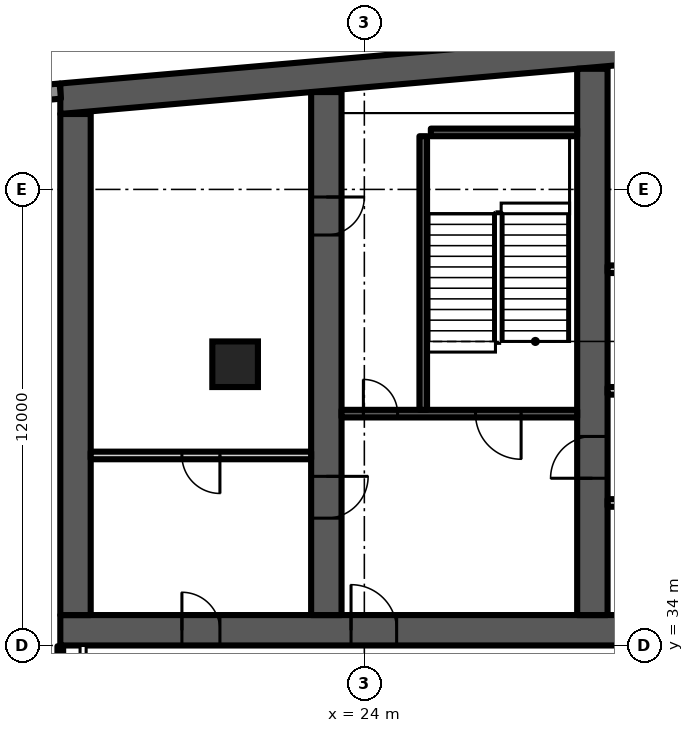
"""IFC4 building model, lengths in metres.
Left out: names, types, materials, properties, quantities, classifications, styles, units other than length and angle.
Written with IfcOpenShell. Run it as: python <this file> out.ifc"""

import sys

from ifc_helpers import new_model, si_unit, direction, frame, frame_2d, origin, origin_2d, place, context, subcontext, project, spatial, polyline, rectangle, outline, extrude, element, fill, save


model = new_model("IFC4")
c1 = context("Model", 3, precision=1e-05, world=origin(), true_north=direction((0.0, 1.0)))
c2 = subcontext(c1, "Body", "Model", "MODEL_VIEW")
j1 = project(units=[si_unit("LENGTHUNIT", "METRE"), si_unit("PLANEANGLEUNIT", "RADIAN")], contexts=[c1])
p1 = place(None, origin())
s1 = spatial("IfcSite", under=j1, at=p1, CompositionType="ELEMENT")
p2 = place(p1, origin())
s2 = spatial("IfcBuilding", under=s1, at=p2, CompositionType="ELEMENT")
p3 = place(p2, frame((0.0, 0.0, 202.3)))
s3 = spatial("IfcBuildingStorey", under=s2, at=p3, CompositionType="ELEMENT", Elevation=202.3)
p4 = place(p3, origin())
e1 = element("IfcWall", 1, at=p4, inside=s3, PredefinedType="SHEAR", context=c2, shape_type="SweptSolid", body=[
    extrude(outline(polyline([(16.0, 47.984), (37.0, 49.822), (58.0, 47.984), (58.0, 48.787), (37.0, 50.625), (16.0, 48.787), (16.0, 47.984)])), origin(), (0.0, 0.0, 1.0), 4.8),
])
p5 = place(p3, frame((16.0, 34.4, 0.0), z_axis=(0.0, 0.0, 1.0), x_axis=(1.0, 0.0, 0.0)))
e2 = element("IfcWall", 2, at=p5, inside=s3, PredefinedType="SHEAR", context=c2, shape_type="SweptSolid", body=[
    extrude(rectangle(XDim=42.0, YDim=0.8, at=frame_2d((21.0, 0.0))), origin(), (0.0, 0.0, 1.0), 4.8),
])
p6 = place(p5, frame((3.2, 0.0, 0.0)))
e3 = element("IfcOpeningElement", 3, at=p6, cuts=e2, PredefinedType="OPENING", context=c2, shape_type="SweptSolid", body=[
    extrude(rectangle(XDim=1.0, YDim=2.1, at=frame_2d((0.5, 1.05))), frame((0.0, 0.41, 0.0), z_axis=(0.0, -1.0, 0.0), x_axis=(1.0, 0.0, 0.0)), (0.0, 0.0, 1.0), 0.82),
])
p7 = place(p5, frame((7.65, 0.0, 0.0)))
e4 = element("IfcOpeningElement", 4, at=p7, cuts=e2, PredefinedType="OPENING", context=c2, shape_type="SweptSolid", body=[
    extrude(rectangle(XDim=1.2, YDim=2.1, at=frame_2d((0.6, 1.05))), frame((0.0, 0.41, 0.0), z_axis=(0.0, -1.0, 0.0), x_axis=(1.0, 0.0, 0.0)), (0.0, 0.0, 1.0), 0.82),
])
p8 = place(p5, frame((14.767, 0.0, 0.0)))
e5 = element("IfcOpeningElement", 5, at=p8, cuts=e2, PredefinedType="OPENING", context=c2, shape_type="SweptSolid", body=[
    extrude(rectangle(XDim=1.1, YDim=2.1, at=frame_2d((0.55, 1.05))), frame((0.0, 0.41, 0.0), z_axis=(0.0, -1.0, 0.0), x_axis=(1.0, 0.0, 0.0)), (0.0, 0.0, 1.0), 0.82),
])
p9 = place(p5, frame((19.133, 0.0, 0.0)))
e6 = element("IfcOpeningElement", 6, at=p9, cuts=e2, PredefinedType="OPENING", context=c2, shape_type="SweptSolid", body=[
    extrude(rectangle(XDim=1.1, YDim=2.1, at=frame_2d((0.55, 1.05))), frame((0.0, 0.41, 0.0), z_axis=(0.0, -1.0, 0.0), x_axis=(1.0, 0.0, 0.0)), (0.0, 0.0, 1.0), 0.82),
])
p10 = place(p5, frame((16.8, 0.0, 0.0)))
e7 = element("IfcOpeningElement", 7, at=p10, cuts=e2, PredefinedType="OPENING", context=c2, shape_type="SweptSolid", body=[
    extrude(rectangle(XDim=1.4, YDim=2.1, at=frame_2d((0.7, 1.05))), frame((0.0, 0.41, 0.0), z_axis=(0.0, -1.0, 0.0), x_axis=(1.0, 0.0, 0.0)), (0.0, 0.0, 1.0), 0.82),
])
p11 = place(p5, frame((21.767, 0.0, 0.0)))
e8 = element("IfcOpeningElement", 8, at=p11, cuts=e2, PredefinedType="OPENING", context=c2, shape_type="SweptSolid", body=[
    extrude(rectangle(XDim=1.1, YDim=2.1, at=frame_2d((0.55, 1.05))), frame((0.0, 0.41, 0.0), z_axis=(0.0, -1.0, 0.0), x_axis=(1.0, 0.0, 0.0)), (0.0, 0.0, 1.0), 0.82),
])
p12 = place(p5, frame((23.95, 0.0, 0.0)))
e9 = element("IfcOpeningElement", 9, at=p12, cuts=e2, PredefinedType="OPENING", context=c2, shape_type="SweptSolid", body=[
    extrude(rectangle(XDim=1.1, YDim=2.1, at=frame_2d((0.55, 1.05))), frame((0.0, 0.41, 0.0), z_axis=(0.0, -1.0, 0.0), x_axis=(1.0, 0.0, 0.0)), (0.0, 0.0, 1.0), 0.82),
])
p13 = place(p5, frame((26.133, 0.0, 0.0)))
e10 = element("IfcOpeningElement", 10, at=p13, cuts=e2, PredefinedType="OPENING", context=c2, shape_type="SweptSolid", body=[
    extrude(rectangle(XDim=1.1, YDim=2.1, at=frame_2d((0.55, 1.05))), frame((0.0, 0.41, 0.0), z_axis=(0.0, -1.0, 0.0), x_axis=(1.0, 0.0, 0.0)), (0.0, 0.0, 1.0), 0.82),
])
p14 = place(p5, frame((33.15, 0.0, 0.0)))
e11 = element("IfcOpeningElement", 11, at=p14, cuts=e2, PredefinedType="OPENING", context=c2, shape_type="SweptSolid", body=[
    extrude(rectangle(XDim=1.2, YDim=2.1, at=frame_2d((0.6, 1.05))), frame((0.0, 0.41, 0.0), z_axis=(0.0, -1.0, 0.0), x_axis=(1.0, 0.0, 0.0)), (0.0, 0.0, 1.0), 0.82),
])
p15 = place(p5, frame((37.767, 0.0, 0.0)))
e12 = element("IfcOpeningElement", 12, at=p15, cuts=e2, PredefinedType="OPENING", context=c2, shape_type="SweptSolid", body=[
    extrude(rectangle(XDim=1.4, YDim=2.1, at=frame_2d((0.7, 1.05))), frame((0.0, 0.41, 0.0), z_axis=(0.0, -1.0, 0.0), x_axis=(1.0, 0.0, 0.0)), (0.0, 0.0, 1.0), 0.82),
])
p16 = place(p3, frame((16.4, 34.8, 0.0), z_axis=(0.0, 0.0, 1.0), x_axis=(0.0, 1.0, 0.0)))
e13 = element("IfcWall", 13, at=p16, inside=s3, PredefinedType="SHEAR", context=c2, shape_type="SweptSolid", body=[
    extrude(rectangle(XDim=13.184, YDim=0.8, at=frame_2d((6.592, 0.0))), origin(), (0.0, 0.0, 1.0), 4.8),
])
p17 = place(p3, frame((23.0, 34.8, 0.0), z_axis=(0.0, 0.0, 1.0), x_axis=(0.0, 1.0, 0.0)))
e14 = element("IfcWall", 14, at=p17, inside=s3, PredefinedType="SHEAR", context=c2, shape_type="SweptSolid", body=[
    extrude(rectangle(XDim=13.762, YDim=0.8, at=frame_2d((6.881, 0.0))), origin(), (0.0, 0.0, 1.0), 4.8),
])
p18 = place(p17, frame((2.55, 0.0, 0.0)))
e15 = element("IfcOpeningElement", 15, at=p18, cuts=e14, PredefinedType="OPENING", context=c2, shape_type="SweptSolid", body=[
    extrude(rectangle(XDim=1.1, YDim=2.1, at=frame_2d((0.55, 1.05))), frame((0.0, 0.41, 0.0), z_axis=(0.0, -1.0, 0.0), x_axis=(1.0, 0.0, 0.0)), (0.0, 0.0, 1.0), 0.82),
])
p19 = place(p17, frame((10.0, 0.0, 0.0)))
e16 = element("IfcOpeningElement", 16, at=p19, cuts=e14, PredefinedType="OPENING", context=c2, shape_type="SweptSolid", body=[
    extrude(rectangle(XDim=1.0, YDim=2.1, at=frame_2d((0.5, 1.05))), frame((0.0, 0.41, 0.0), z_axis=(0.0, -1.0, 0.0), x_axis=(1.0, 0.0, 0.0)), (0.0, 0.0, 1.0), 0.82),
])
p20 = place(p3, frame((30.0, 34.8, 0.0), z_axis=(0.0, 0.0, 1.0), x_axis=(0.0, 1.0, 0.0)))
e17 = element("IfcWall", 17, at=p20, inside=s3, PredefinedType="SHEAR", context=c2, shape_type="SweptSolid", body=[
    extrude(rectangle(XDim=14.374, YDim=0.8, at=frame_2d((7.187, 0.0))), origin(), (0.0, 0.0, 1.0), 4.8),
])
p21 = place(p20, frame((3.6, 0.0, 0.0)))
e18 = element("IfcOpeningElement", 18, at=p21, cuts=e17, PredefinedType="OPENING", context=c2, shape_type="SweptSolid", body=[
    extrude(rectangle(XDim=1.1, YDim=2.1, at=frame_2d((0.55, 1.05))), frame((0.0, 0.41, 0.0), z_axis=(0.0, -1.0, 0.0), x_axis=(1.0, 0.0, 0.0)), (0.0, 0.0, 1.0), 0.82),
])
p22 = place(p3, frame((20.6, 41.4, 0.0), z_axis=(0.0, 0.0, 1.0), x_axis=(1.0, 0.0, 0.0)))
e19 = element("IfcColumn", 19, at=p22, inside=s3, PredefinedType="COLUMN", context=c2, shape_type="SweptSolid", body=[
    extrude(rectangle(XDim=1.2, YDim=1.2, at=origin_2d()), origin(), (0.0, 0.0, 1.0), 4.8),
])
p23 = place(p3, frame((16.0, 48.587, 0.0), z_axis=(0.0, 0.0, 1.0), x_axis=(-0.996194, -0.087168, 0.0)))
e20 = element("IfcWall", 20, at=p23, inside=s3, PredefinedType="SOLIDWALL", context=c2, shape_type="SweptSolid", body=[
    extrude(rectangle(XDim=2.994, YDim=0.4, at=frame_2d((1.497, 0.0))), origin(), (0.0, 0.0, 1.0), 4.4),
])
p24 = place(p3, frame((16.8, 39.0, 0.0), z_axis=(0.0, 0.0, 1.0), x_axis=(1.0, 0.0, 0.0)))
e21 = element("IfcWall", 21, at=p24, inside=s3, PredefinedType="PARTITIONING", context=c2, shape_type="SweptSolid", body=[
    extrude(rectangle(XDim=5.8, YDim=0.2, at=frame_2d((2.9, 0.0))), origin(), (0.0, 0.0, 1.0), 4.4),
])
p25 = place(p24, frame((2.4, 0.0, 0.0)))
e22 = element("IfcOpeningElement", 22, at=p25, cuts=e21, PredefinedType="OPENING", context=c2, shape_type="SweptSolid", body=[
    extrude(rectangle(XDim=1.0, YDim=2.1, at=frame_2d((0.5, 1.05))), frame((0.0, 0.11, 0.0), z_axis=(0.0, -1.0, 0.0), x_axis=(1.0, 0.0, 0.0)), (0.0, 0.0, 1.0), 0.22),
])
p26 = place(p3, frame((23.4, 40.1, 0.0), z_axis=(0.0, 0.0, 1.0), x_axis=(1.0, 0.0, 0.0)))
e23 = element("IfcWall", 23, at=p26, inside=s3, PredefinedType="SHEAR", context=c2, shape_type="SweptSolid", body=[
    extrude(rectangle(XDim=6.2, YDim=0.2, at=frame_2d((3.1, 0.0))), origin(), (0.0, 0.0, 1.0), 4.4),
])
p27 = place(p26, frame((3.525, 0.0, 0.0)))
e24 = element("IfcOpeningElement", 24, at=p27, cuts=e23, PredefinedType="OPENING", context=c2, shape_type="SweptSolid", body=[
    extrude(rectangle(XDim=1.2, YDim=2.1, at=frame_2d((0.6, 1.05))), frame((0.0, 0.11, 0.0), z_axis=(0.0, -1.0, 0.0), x_axis=(1.0, 0.0, 0.0)), (0.0, 0.0, 1.0), 0.22),
])
p28 = place(p26, frame((0.575, 0.0, 0.0)))
e25 = element("IfcOpeningElement", 25, at=p28, cuts=e23, PredefinedType="OPENING", context=c2, shape_type="SweptSolid", body=[
    extrude(rectangle(XDim=0.9, YDim=2.1, at=frame_2d((0.45, 1.05))), frame((0.0, 0.11, 0.0), z_axis=(0.0, -1.0, 0.0), x_axis=(1.0, 0.0, 0.0)), (0.0, 0.0, 1.0), 0.22),
])
p29 = place(p3, frame((25.55, 40.2, 0.0), z_axis=(0.0, 0.0, 1.0), x_axis=(0.0, 1.0, 0.0)))
e26 = element("IfcWall", 26, at=p29, inside=s3, PredefinedType="SHEAR", context=c2, shape_type="SweptSolid", body=[
    extrude(rectangle(XDim=7.2, YDim=0.2, at=frame_2d((3.6, 0.0))), origin(), (0.0, 0.0, 1.0), 4.4),
])
p30 = place(p3, frame((25.75, 47.5, 0.0), z_axis=(0.0, 0.0, 1.0), x_axis=(1.0, 0.0, 0.0)))
e27 = element("IfcWall", 27, at=p30, inside=s3, PredefinedType="SHEAR", context=c2, shape_type="SweptSolid", body=[
    extrude(rectangle(XDim=3.85, YDim=0.2, at=frame_2d((1.925, 0.0))), origin(), (0.0, 0.0, 1.0), 4.4),
])
p31 = place(p3, frame((30.4, 40.7, 0.0), z_axis=(0.0, 0.0, 1.0), x_axis=(1.0, 0.0, 0.0)))
e28 = element("IfcWall", 28, at=p31, inside=s3, PredefinedType="PARTITIONING", context=c2, shape_type="SweptSolid", body=[
    extrude(rectangle(XDim=6.2, YDim=0.2, at=frame_2d((3.1, 0.0))), origin(), (0.0, 0.0, 1.0), 4.4),
])
p32 = place(p31, frame((0.367, 0.0, 0.0)))
e29 = element("IfcOpeningElement", 29, at=p32, cuts=e28, PredefinedType="OPENING", context=c2, shape_type="SweptSolid", body=[
    extrude(rectangle(XDim=1.1, YDim=2.1, at=frame_2d((0.55, 1.05))), frame((0.0, 0.11, 0.0), z_axis=(0.0, -1.0, 0.0), x_axis=(1.0, 0.0, 0.0)), (0.0, 0.0, 1.0), 0.22),
])
p33 = place(p31, frame((2.55, 0.0, 0.0)))
e30 = element("IfcOpeningElement", 30, at=p33, cuts=e28, PredefinedType="OPENING", context=c2, shape_type="SweptSolid", body=[
    extrude(rectangle(XDim=1.1, YDim=2.1, at=frame_2d((0.55, 1.05))), frame((0.0, 0.11, 0.0), z_axis=(0.0, -1.0, 0.0), x_axis=(1.0, 0.0, 0.0)), (0.0, 0.0, 1.0), 0.22),
])
p34 = place(p31, frame((4.733, 0.0, 0.0)))
e31 = element("IfcOpeningElement", 31, at=p34, cuts=e28, PredefinedType="OPENING", context=c2, shape_type="SweptSolid", body=[
    extrude(rectangle(XDim=1.1, YDim=2.1, at=frame_2d((0.55, 1.05))), frame((0.0, 0.11, 0.0), z_axis=(0.0, -1.0, 0.0), x_axis=(1.0, 0.0, 0.0)), (0.0, 0.0, 1.0), 0.22),
])
p35 = place(p3, frame((0.0, 0.0, -0.0)))
e32 = element("IfcWall", 32, at=p35, inside=s3, PredefinedType="PARTITIONING", context=c2, shape_type="SweptSolid", body=[
    extrude(outline(polyline([(32.233, 37.65), (30.4, 37.65), (30.4, 37.85), (32.233, 37.85), (32.433, 37.85), (32.433, 34.8), (32.233, 34.8), (32.233, 37.65)])), origin(), (0.0, 0.0, 1.0), 4.4),
])
p36 = place(p3, frame((0.0, 0.0, -0.0)))
e33 = element("IfcWall", 33, at=p36, inside=s3, PredefinedType="PARTITIONING", context=c2, shape_type="SweptSolid", body=[
    extrude(outline(polyline([(32.433, 40.8), (32.233, 40.8), (32.233, 43.8), (30.4, 43.8), (30.4, 44.0), (36.6, 44.0), (36.6, 43.8), (34.767, 43.8), (34.767, 40.8), (34.567, 40.8), (34.567, 43.8), (32.433, 43.8), (32.433, 40.8)])), origin(), (0.0, 0.0, 1.0), 4.4),
])
p37 = place(p3, frame((16.0, 30.5, 0.0), z_axis=(0.0, 0.0, 1.0), x_axis=(0.0, 1.0, 0.0)))
e34 = element("IfcWall", 34, at=p37, inside=s3, PredefinedType="PARTITIONING", context=c2, shape_type="SweptSolid", body=[
    extrude(rectangle(XDim=3.48, YDim=0.15, at=frame_2d((1.74, 0.0))), origin(), (0.0, 0.0, 1.0), 4.4),
])
p38 = place(p6, origin())
e35 = element("IfcDoor", 35, at=p38, inside=s3, OperationType="SINGLE_SWING_LEFT", PredefinedType="DOOR", context=c2, shape_type="SweptSolid", body=[
    extrude(rectangle(XDim=1.0, YDim=2.1, at=frame_2d((0.5, 1.05))), frame((0.0, 0.4, 0.0), z_axis=(0.0, -1.0, 0.0), x_axis=(1.0, 0.0, 0.0)), (0.0, 0.0, 1.0), 0.8),
])
fill(e3, e35)
p39 = place(p25, origin())
e36 = element("IfcDoor", 36, at=p39, inside=s3, OperationType="SINGLE_SWING_RIGHT", PredefinedType="DOOR", context=c2, shape_type="SweptSolid", body=[
    extrude(rectangle(XDim=1.0, YDim=2.1, at=frame_2d((0.5, 1.05))), frame((0.0, 0.025, 0.0), z_axis=(0.0, -1.0, 0.0), x_axis=(1.0, 0.0, 0.0)), (0.0, 0.0, 1.0), 0.05),
])
fill(e22, e36)
p40 = place(p27, origin())
e37 = element("IfcDoor", 37, at=p40, inside=s3, OperationType="SINGLE_SWING_RIGHT", PredefinedType="DOOR", context=c2, shape_type="SweptSolid", body=[
    extrude(rectangle(XDim=1.2, YDim=2.1, at=frame_2d((0.6, 1.05))), frame((0.0, 0.025, 0.0), z_axis=(0.0, -1.0, 0.0), x_axis=(1.0, 0.0, 0.0)), (0.0, 0.0, 1.0), 0.05),
])
fill(e24, e37)
p41 = place(p28, origin())
e38 = element("IfcDoor", 38, at=p41, inside=s3, OperationType="SINGLE_SWING_LEFT", PredefinedType="DOOR", context=c2, shape_type="SweptSolid", body=[
    extrude(rectangle(XDim=0.9, YDim=2.1, at=frame_2d((0.45, 1.05))), frame((0.0, 0.025, 0.0), z_axis=(0.0, -1.0, 0.0), x_axis=(1.0, 0.0, 0.0)), (0.0, 0.0, 1.0), 0.05),
])
fill(e25, e38)
p42 = place(p7, origin())
e39 = element("IfcDoor", 39, at=p42, inside=s3, OperationType="SINGLE_SWING_LEFT", PredefinedType="DOOR", context=c2, shape_type="SweptSolid", body=[
    extrude(rectangle(XDim=1.2, YDim=2.1, at=frame_2d((0.6, 1.05))), frame((0.0, 0.025, 0.0), z_axis=(0.0, -1.0, 0.0), x_axis=(1.0, 0.0, 0.0)), (0.0, 0.0, 1.0), 0.05),
])
fill(e4, e39)
p43 = place(p18, origin())
e40 = element("IfcDoor", 40, at=p43, inside=s3, OperationType="SINGLE_SWING_RIGHT", PredefinedType="DOOR", context=c2, shape_type="SweptSolid", body=[
    extrude(rectangle(XDim=1.1, YDim=2.1, at=frame_2d((0.55, 1.05))), frame((0.0, 0.025, 0.0), z_axis=(0.0, -1.0, 0.0), x_axis=(1.0, 0.0, 0.0)), (0.0, 0.0, 1.0), 0.05),
])
fill(e15, e40)
p44 = place(p19, origin())
e41 = element("IfcDoor", 41, at=p44, inside=s3, OperationType="SINGLE_SWING_RIGHT", PredefinedType="DOOR", context=c2, shape_type="SweptSolid", body=[
    extrude(rectangle(XDim=1.0, YDim=2.1, at=frame_2d((0.5, 1.05))), frame((0.0, 0.4, 0.0), z_axis=(0.0, -1.0, 0.0), x_axis=(1.0, 0.0, 0.0)), (0.0, 0.0, 1.0), 0.8),
])
fill(e16, e41)
p45 = place(p21, origin())
e42 = element("IfcDoor", 42, at=p45, inside=s3, OperationType="SINGLE_SWING_LEFT", PredefinedType="DOOR", context=c2, shape_type="SweptSolid", body=[
    extrude(rectangle(XDim=1.1, YDim=2.1, at=frame_2d((0.55, 1.05))), frame((0.0, 0.025, 0.0), z_axis=(0.0, -1.0, 0.0), x_axis=(1.0, 0.0, 0.0)), (0.0, 0.0, 1.0), 0.05),
])
fill(e18, e42)
save(model, sys.argv[1])
